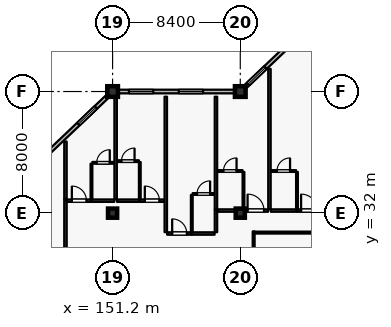
"""IFC4 building model, lengths in metres.
Left out: names, types, materials, properties, quantities, classifications, styles, units other than length and angle.
Written with IfcOpenShell. Run it as: python <this file> out.ifc"""

import sys

from ifc_helpers import new_model, si_unit, direction, frame, frame_2d, origin, origin_2d, place, context, subcontext, project, spatial, rectangle, extrude, element, fill, save


model = new_model("IFC4")
c1 = context("Model", 3, precision=1e-05, world=origin(), true_north=direction((0.0, 1.0)))
c2 = subcontext(c1, "Body", "Model", "MODEL_VIEW")
j1 = project(units=[si_unit("LENGTHUNIT", "METRE"), si_unit("PLANEANGLEUNIT", "RADIAN")], contexts=[c1])
p1 = place(None, origin())
s1 = spatial("IfcSite", under=j1, at=p1, CompositionType="ELEMENT")
p2 = place(p1, origin())
s2 = spatial("IfcBuilding", under=s1, at=p2, CompositionType="ELEMENT")
p3 = place(p2, frame((0.0, 0.0, 32.4)))
s3 = spatial("IfcBuildingStorey", under=s2, at=p3, CompositionType="ELEMENT", Elevation=32.4)
for number, where, z_axis, x_axis in (
    (1, (151.2, 40.0, 0.0), (0.0, 0.0, 1.0), (1.0, 0.0, 0.0)),
    (2, (159.6, 40.0, 0.0), (0.0, 0.0, 1.0), (1.0, 0.0, 0.0)),
):
    element("IfcColumn", number, at=place(p3, frame(where, z_axis=z_axis, x_axis=x_axis)), inside=s3, PredefinedType="COLUMN", context=c2, shape_type="SweptSolid", body=[
        extrude(rectangle(XDim=0.7, YDim=0.7, at=origin_2d()), origin(), (0.0, 0.0, 1.0), 3.6),
    ])
for number, where, z_axis, x_axis in (
    (3, (151.2, 32.0, 0.0), (0.0, 0.0, 1.0), (1.0, 0.0, 0.0)),
    (4, (159.6, 32.0, 0.0), (0.0, 0.0, 1.0), (1.0, 0.0, 0.0)),
):
    element("IfcColumn", number, at=place(p3, frame(where, z_axis=z_axis, x_axis=x_axis)), inside=s3, PredefinedType="COLUMN", context=c2, shape_type="SweptSolid", body=[
        extrude(rectangle(XDim=0.6, YDim=0.6, at=origin_2d()), origin(), (0.0, 0.0, 1.0), 3.6),
    ])
p4 = place(p3, frame((143.15, 32.333, 0.0), z_axis=(0.0, 0.0, 1.0), x_axis=(0.724116091282, 0.689678103427, 0.0)))
e5 = element("IfcWall", 5, at=p4, inside=s3, PredefinedType="SOLIDWALL", context=c2, shape_type="SweptSolid", body=[
    extrude(rectangle(XDim=10.634, YDim=0.24, at=frame_2d((5.317, 0.0))), origin(), (0.0, 0.0, 1.0), 2.94),
])
p5 = place(p4, frame((0.27, 0.0, 0.8)))
e6 = element("IfcOpeningElement", 6, at=p5, cuts=e5, PredefinedType="OPENING", context=c2, shape_type="SweptSolid", body=[
    extrude(rectangle(XDim=1.6, YDim=1.6, at=frame_2d((0.8, 0.8))), frame((0.0, 0.13, 0.0), z_axis=(0.0, -1.0, 0.0), x_axis=(1.0, 0.0, 0.0)), (0.0, 0.0, 1.0), 0.26),
])
p6 = place(p4, frame((3.757, 0.0, 0.8)))
e7 = element("IfcOpeningElement", 7, at=p6, cuts=e5, PredefinedType="OPENING", context=c2, shape_type="SweptSolid", body=[
    extrude(rectangle(XDim=1.6, YDim=1.6, at=frame_2d((0.8, 0.8))), frame((0.0, 0.13, 0.0), z_axis=(0.0, -1.0, 0.0), x_axis=(1.0, 0.0, 0.0)), (0.0, 0.0, 1.0), 0.26),
])
p7 = place(p4, frame((8.004, 0.0, 0.8)))
e8 = element("IfcOpeningElement", 8, at=p7, cuts=e5, PredefinedType="OPENING", context=c2, shape_type="SweptSolid", body=[
    extrude(rectangle(XDim=1.6, YDim=1.6, at=frame_2d((0.8, 0.8))), frame((0.0, 0.13, 0.0), z_axis=(0.0, -1.0, 0.0), x_axis=(1.0, 0.0, 0.0)), (0.0, 0.0, 1.0), 0.26),
])
p8 = place(p3, frame((151.55, 40.0, 0.0), z_axis=(0.0, 0.0, 1.0), x_axis=(1.0, 0.0, 0.0)))
e9 = element("IfcWall", 9, at=p8, inside=s3, PredefinedType="SOLIDWALL", context=c2, shape_type="SweptSolid", body=[
    extrude(rectangle(XDim=7.7, YDim=0.24, at=frame_2d((3.85, 0.0))), origin(), (0.0, 0.0, 1.0), 2.94),
])
p9 = place(p8, frame((0.725, 0.0, 0.8)))
e10 = element("IfcOpeningElement", 10, at=p9, cuts=e9, PredefinedType="OPENING", context=c2, shape_type="SweptSolid", body=[
    extrude(rectangle(XDim=1.6, YDim=1.6, at=frame_2d((0.8, 0.8))), frame((0.0, 0.13, 0.0), z_axis=(0.0, -1.0, 0.0), x_axis=(1.0, 0.0, 0.0)), (0.0, 0.0, 1.0), 0.26),
])
p10 = place(p8, frame((4.0, 0.0, 0.8)))
e11 = element("IfcOpeningElement", 11, at=p10, cuts=e9, PredefinedType="OPENING", context=c2, shape_type="SweptSolid", body=[
    extrude(rectangle(XDim=1.6, YDim=1.6, at=frame_2d((0.8, 0.8))), frame((0.0, 0.13, 0.0), z_axis=(0.0, -1.0, 0.0), x_axis=(1.0, 0.0, 0.0)), (0.0, 0.0, 1.0), 0.26),
])
p11 = place(p3, frame((159.95, 40.333, 0.0), z_axis=(0.0, 0.0, 1.0), x_axis=(0.724105170588, 0.689689569247, 0.0)))
e12 = element("IfcWall", 12, at=p11, inside=s3, PredefinedType="SOLIDWALL", context=c2, shape_type="SweptSolid", body=[
    extrude(rectangle(XDim=10.634, YDim=0.24, at=frame_2d((5.317, 0.0))), origin(), (0.0, 0.0, 1.0), 2.89),
])
p12 = place(p11, frame((0.215, 0.0, 0.8)))
e13 = element("IfcOpeningElement", 13, at=p12, cuts=e12, PredefinedType="OPENING", context=c2, shape_type="SweptSolid", body=[
    extrude(rectangle(XDim=1.6, YDim=1.6, at=frame_2d((0.8, 0.8))), frame((0.0, 0.13, 0.0), z_axis=(0.0, -1.0, 0.0), x_axis=(1.0, 0.0, 0.0)), (0.0, 0.0, 1.0), 0.26),
])
p13 = place(p11, frame((3.599, 0.0, 0.8)))
e14 = element("IfcOpeningElement", 14, at=p13, cuts=e12, PredefinedType="OPENING", context=c2, shape_type="SweptSolid", body=[
    extrude(rectangle(XDim=2.0, YDim=1.75, at=frame_2d((1.0, 0.875))), frame((0.0, 0.13, 0.0), z_axis=(0.0, -1.0, 0.0), x_axis=(1.0, 0.0, 0.0)), (0.0, 0.0, 1.0), 0.26),
])
p14 = place(p11, frame((7.901, 0.0, 0.8)))
e15 = element("IfcOpeningElement", 15, at=p14, cuts=e12, PredefinedType="OPENING", context=c2, shape_type="SweptSolid", body=[
    extrude(rectangle(XDim=2.0, YDim=1.75, at=frame_2d((1.0, 0.875))), frame((0.0, 0.13, 0.0), z_axis=(0.0, -1.0, 0.0), x_axis=(1.0, 0.0, 0.0)), (0.0, 0.0, 1.0), 0.26),
])
p15 = place(p3, frame((148.1, 28.46, 0.0), z_axis=(0.0, 0.0, 1.0), x_axis=(0.0, 1.0, 0.0)))
e16 = element("IfcWall", 16, at=p15, inside=s3, PredefinedType="PARTITIONING", context=c2, shape_type="SweptSolid", body=[
    extrude(rectangle(XDim=4.44, YDim=0.16, at=frame_2d((2.22, 0.0))), origin(), (0.0, 0.0, 1.0), 3.335),
])
p16 = place(p3, frame((148.19, 32.82, 0.0), z_axis=(0.0, 0.0, 1.0), x_axis=(1.0, 0.0, 0.0)))
e17 = element("IfcWall", 17, at=p16, inside=s3, PredefinedType="PARTITIONING", context=c2, shape_type="SweptSolid", body=[
    extrude(rectangle(XDim=1.62, YDim=0.16, at=frame_2d((0.81, 0.0))), origin(), (0.0, 0.0, 1.0), 3.335),
])
p17 = place(p16, frame((0.33, 0.0, 0.0)))
e18 = element("IfcOpeningElement", 18, at=p17, cuts=e17, PredefinedType="OPENING", context=c2, shape_type="SweptSolid", body=[
    extrude(rectangle(XDim=0.96, YDim=2.2, at=frame_2d((0.48, 1.1))), frame((0.0, 0.09, 0.0), z_axis=(0.0, -1.0, 0.0), x_axis=(1.0, 0.0, 0.0)), (0.0, 0.0, 1.0), 0.18),
])
p18 = place(p3, frame((149.82, 32.82, 0.0), z_axis=(0.0, 0.0, 1.0), x_axis=(1.0, 0.0, 0.0)))
e19 = element("IfcWall", 19, at=p18, inside=s3, PredefinedType="PARTITIONING", context=c2, shape_type="SweptSolid", body=[
    extrude(rectangle(XDim=1.49, YDim=0.16, at=frame_2d((0.745, 0.0))), origin(), (0.0, 0.0, 1.0), 3.335),
])
p19 = place(p3, frame((149.81, 32.91, 0.0), z_axis=(0.0, 0.0, 1.0), x_axis=(0.0, 1.0, 0.0)))
e20 = element("IfcWall", 20, at=p19, inside=s3, PredefinedType="PARTITIONING", context=c2, shape_type="SweptSolid", body=[
    extrude(rectangle(XDim=2.34, YDim=0.115, at=frame_2d((1.17, 0.0))), origin(), (0.0, 0.0, 1.0), 3.335),
])
p20 = place(p3, frame((149.87, 35.31, 0.0), z_axis=(0.0, 0.0, 1.0), x_axis=(1.0, 0.0, 0.0)))
e21 = element("IfcWall", 21, at=p20, inside=s3, PredefinedType="PARTITIONING", context=c2, shape_type="SweptSolid", body=[
    extrude(rectangle(XDim=1.43, YDim=0.115, at=frame_2d((0.715, 0.0))), origin(), (0.0, 0.0, 1.0), 3.335),
])
p21 = place(p20, frame((0.285, 0.0, 0.0)))
e22 = element("IfcOpeningElement", 22, at=p21, cuts=e21, PredefinedType="OPENING", context=c2, shape_type="SweptSolid", body=[
    extrude(rectangle(XDim=0.86, YDim=2.12, at=frame_2d((0.43, 1.06))), frame((0.0, 0.067, 0.0), z_axis=(0.0, -1.0, 0.0), x_axis=(1.0, 0.0, 0.0)), (0.0, 0.0, 1.0), 0.135),
])
p22 = place(p3, frame((148.1, 32.91, 0.0), z_axis=(0.0, 0.0, 1.0), x_axis=(0.0, 1.0, 0.0)))
e23 = element("IfcWall", 23, at=p22, inside=s3, PredefinedType="PARTITIONING", context=c2, shape_type="SweptSolid", body=[
    extrude(rectangle(XDim=3.8, YDim=0.16, at=frame_2d((1.9, 0.0))), origin(), (0.0, 0.0, 1.0), 3.335),
])
p23 = place(p3, frame((151.49, 32.82, 0.0), z_axis=(0.0, 0.0, 1.0), x_axis=(1.0, 0.0, 0.0)))
e24 = element("IfcWall", 24, at=p23, inside=s3, PredefinedType="PARTITIONING", context=c2, shape_type="SweptSolid", body=[
    extrude(rectangle(XDim=1.49, YDim=0.16, at=frame_2d((0.745, 0.0))), origin(), (0.0, 0.0, 1.0), 3.335),
])
p24 = place(p3, frame((152.99, 32.82, 0.0), z_axis=(0.0, 0.0, 1.0), x_axis=(1.0, 0.0, 0.0)))
e25 = element("IfcWall", 25, at=p24, inside=s3, PredefinedType="PARTITIONING", context=c2, shape_type="SweptSolid", body=[
    extrude(rectangle(XDim=1.62, YDim=0.16, at=frame_2d((0.81, 0.0))), origin(), (0.0, 0.0, 1.0), 3.335),
])
p25 = place(p24, frame((0.33, 0.0, 0.0)))
e26 = element("IfcOpeningElement", 26, at=p25, cuts=e25, PredefinedType="OPENING", context=c2, shape_type="SweptSolid", body=[
    extrude(rectangle(XDim=0.96, YDim=2.2, at=frame_2d((0.48, 1.1))), frame((0.0, 0.09, 0.0), z_axis=(0.0, -1.0, 0.0), x_axis=(1.0, 0.0, 0.0)), (0.0, 0.0, 1.0), 0.18),
])
p26 = place(p3, frame((152.99, 32.91, 0.0), z_axis=(0.0, 0.0, 1.0), x_axis=(0.0, 1.0, 0.0)))
e27 = element("IfcWall", 27, at=p26, inside=s3, PredefinedType="PARTITIONING", context=c2, shape_type="SweptSolid", body=[
    extrude(rectangle(XDim=2.45, YDim=0.115, at=frame_2d((1.225, 0.0))), origin(), (0.0, 0.0, 1.0), 3.335),
])
p27 = place(p3, frame((151.5, 35.42, 0.0), z_axis=(0.0, 0.0, 1.0), x_axis=(1.0, 0.0, 0.0)))
e28 = element("IfcWall", 28, at=p27, inside=s3, PredefinedType="PARTITIONING", context=c2, shape_type="SweptSolid", body=[
    extrude(rectangle(XDim=1.43, YDim=0.115, at=frame_2d((0.715, 0.0))), origin(), (0.0, 0.0, 1.0), 3.335),
])
p28 = place(p27, frame((0.285, 0.0, 0.0)))
e29 = element("IfcOpeningElement", 29, at=p28, cuts=e28, PredefinedType="OPENING", context=c2, shape_type="SweptSolid", body=[
    extrude(rectangle(XDim=0.86, YDim=2.12, at=frame_2d((0.43, 1.06))), frame((0.0, 0.067, 0.0), z_axis=(0.0, -1.0, 0.0), x_axis=(1.0, 0.0, 0.0)), (0.0, 0.0, 1.0), 0.135),
])
p29 = place(p3, frame((151.4, 32.91, 0.0), z_axis=(0.0, 0.0, 1.0), x_axis=(0.0, 1.0, 0.0)))
e30 = element("IfcWall", 30, at=p29, inside=s3, PredefinedType="PARTITIONING", context=c2, shape_type="SweptSolid", body=[
    extrude(rectangle(XDim=6.75, YDim=0.16, at=frame_2d((3.375, 0.0))), origin(), (0.0, 0.0, 1.0), 2.74),
])
p30 = place(p3, frame((154.79, 30.66, 0.0), z_axis=(0.0, 0.0, 1.0), x_axis=(1.0, 0.0, 0.0)))
e31 = element("IfcWall", 31, at=p30, inside=s3, PredefinedType="PARTITIONING", context=c2, shape_type="SweptSolid", body=[
    extrude(rectangle(XDim=1.62, YDim=0.16, at=frame_2d((0.81, 0.0))), origin(), (0.0, 0.0, 1.0), 3.335),
])
p31 = place(p30, frame((0.33, 0.0, 0.0)))
e32 = element("IfcOpeningElement", 32, at=p31, cuts=e31, PredefinedType="OPENING", context=c2, shape_type="SweptSolid", body=[
    extrude(rectangle(XDim=0.96, YDim=2.2, at=frame_2d((0.48, 1.1))), frame((0.0, 0.09, 0.0), z_axis=(0.0, -1.0, 0.0), x_axis=(1.0, 0.0, 0.0)), (0.0, 0.0, 1.0), 0.18),
])
p32 = place(p3, frame((156.42, 30.66, 0.0), z_axis=(0.0, 0.0, 1.0), x_axis=(1.0, 0.0, 0.0)))
e33 = element("IfcWall", 33, at=p32, inside=s3, PredefinedType="PARTITIONING", context=c2, shape_type="SweptSolid", body=[
    extrude(rectangle(XDim=1.49, YDim=0.16, at=frame_2d((0.745, 0.0))), origin(), (0.0, 0.0, 1.0), 3.335),
])
p33 = place(p3, frame((156.41, 30.75, 0.0), z_axis=(0.0, 0.0, 1.0), x_axis=(0.0, 1.0, 0.0)))
e34 = element("IfcWall", 34, at=p33, inside=s3, PredefinedType="PARTITIONING", context=c2, shape_type="SweptSolid", body=[
    extrude(rectangle(XDim=2.45, YDim=0.115, at=frame_2d((1.225, 0.0))), origin(), (0.0, 0.0, 1.0), 3.335),
])
p34 = place(p3, frame((156.47, 33.26, 0.0), z_axis=(0.0, 0.0, 1.0), x_axis=(1.0, 0.0, 0.0)))
e35 = element("IfcWall", 35, at=p34, inside=s3, PredefinedType="PARTITIONING", context=c2, shape_type="SweptSolid", body=[
    extrude(rectangle(XDim=1.43, YDim=0.115, at=frame_2d((0.715, 0.0))), origin(), (0.0, 0.0, 1.0), 3.335),
])
p35 = place(p34, frame((0.285, 0.0, 0.0)))
e36 = element("IfcOpeningElement", 36, at=p35, cuts=e35, PredefinedType="OPENING", context=c2, shape_type="SweptSolid", body=[
    extrude(rectangle(XDim=0.86, YDim=2.12, at=frame_2d((0.43, 1.06))), frame((0.0, 0.067, 0.0), z_axis=(0.0, -1.0, 0.0), x_axis=(1.0, 0.0, 0.0)), (0.0, 0.0, 1.0), 0.135),
])
p36 = place(p3, frame((154.7, 30.75, 0.0), z_axis=(0.0, 0.0, 1.0), x_axis=(0.0, 1.0, 0.0)))
e37 = element("IfcWall", 37, at=p36, inside=s3, PredefinedType="PARTITIONING", context=c2, shape_type="SweptSolid", body=[
    extrude(rectangle(XDim=8.91, YDim=0.16, at=frame_2d((4.455, 0.0))), origin(), (0.0, 0.0, 1.0), 3.335),
])
p37 = place(p3, frame((158.0, 30.75, 0.0), z_axis=(0.0, 0.0, 1.0), x_axis=(0.0, 1.0, 0.0)))
e38 = element("IfcWall", 38, at=p37, inside=s3, PredefinedType="PARTITIONING", context=c2, shape_type="SweptSolid", body=[
    extrude(rectangle(XDim=1.5, YDim=0.16, at=frame_2d((0.75, 0.0))), origin(), (0.0, 0.0, 1.0), 3.335),
])
p38 = place(p3, frame((158.09, 32.17, 0.0), z_axis=(0.0, 0.0, 1.0), x_axis=(1.0, 0.0, 0.0)))
e39 = element("IfcWall", 39, at=p38, inside=s3, PredefinedType="PARTITIONING", context=c2, shape_type="SweptSolid", body=[
    extrude(rectangle(XDim=1.71, YDim=0.16, at=frame_2d((0.855, 0.0))), origin(), (0.0, 0.0, 1.0), 2.84),
])
p39 = place(p3, frame((159.81, 32.17, 0.0), z_axis=(0.0, 0.0, 1.0), x_axis=(1.0, 0.0, 0.0)))
e40 = element("IfcWall", 40, at=p39, inside=s3, PredefinedType="PARTITIONING", context=c2, shape_type="SweptSolid", body=[
    extrude(rectangle(XDim=1.62, YDim=0.16, at=frame_2d((0.81, 0.0))), origin(), (0.0, 0.0, 1.0), 3.335),
])
p40 = place(p39, frame((0.27, 0.0, 0.0)))
e41 = element("IfcOpeningElement", 41, at=p40, cuts=e40, PredefinedType="OPENING", context=c2, shape_type="SweptSolid", body=[
    extrude(rectangle(XDim=1.08, YDim=2.3, at=frame_2d((0.54, 1.15))), frame((0.0, 0.09, 0.0), z_axis=(0.0, -1.0, 0.0), x_axis=(1.0, 0.0, 0.0)), (0.0, 0.0, 1.0), 0.18),
])
p41 = place(p3, frame((159.81, 32.26, 0.0), z_axis=(0.0, 0.0, 1.0), x_axis=(0.0, 1.0, 0.0)))
e42 = element("IfcWall", 42, at=p41, inside=s3, PredefinedType="PARTITIONING", context=c2, shape_type="SweptSolid", body=[
    extrude(rectangle(XDim=2.45, YDim=0.115, at=frame_2d((1.225, 0.0))), origin(), (0.0, 0.0, 1.0), 2.74),
])
p42 = place(p3, frame((158.1, 34.77, 0.0), z_axis=(0.0, 0.0, 1.0), x_axis=(1.0, 0.0, 0.0)))
e43 = element("IfcWall", 43, at=p42, inside=s3, PredefinedType="PARTITIONING", context=c2, shape_type="SweptSolid", body=[
    extrude(rectangle(XDim=1.65, YDim=0.115, at=frame_2d((0.825, 0.0))), origin(), (0.0, 0.0, 1.0), 3.335),
])
p43 = place(p42, frame((0.395, 0.0, 0.0)))
e44 = element("IfcOpeningElement", 44, at=p43, cuts=e43, PredefinedType="OPENING", context=c2, shape_type="SweptSolid", body=[
    extrude(rectangle(XDim=0.86, YDim=2.12, at=frame_2d((0.43, 1.06))), frame((0.0, 0.067, 0.0), z_axis=(0.0, -1.0, 0.0), x_axis=(1.0, 0.0, 0.0)), (0.0, 0.0, 1.0), 0.135),
])
p44 = place(p3, frame((158.0, 32.26, 0.0), z_axis=(0.0, 0.0, 1.0), x_axis=(0.0, 1.0, 0.0)))
e45 = element("IfcWall", 45, at=p44, inside=s3, PredefinedType="PARTITIONING", context=c2, shape_type="SweptSolid", body=[
    extrude(rectangle(XDim=7.4, YDim=0.16, at=frame_2d((3.7, 0.0))), origin(), (0.0, 0.0, 1.0), 3.335),
])
p45 = place(p3, frame((161.61, 32.17, 0.0), z_axis=(0.0, 0.0, 1.0), x_axis=(1.0, 0.0, 0.0)))
e46 = element("IfcWall", 46, at=p45, inside=s3, PredefinedType="PARTITIONING", context=c2, shape_type="SweptSolid", body=[
    extrude(rectangle(XDim=1.71, YDim=0.16, at=frame_2d((0.855, 0.0))), origin(), (0.0, 0.0, 1.0), 3.335),
])
p46 = place(p3, frame((163.33, 32.17, 0.0), z_axis=(0.0, 0.0, 1.0), x_axis=(1.0, 0.0, 0.0)))
e47 = element("IfcWall", 47, at=p46, inside=s3, PredefinedType="PARTITIONING", context=c2, shape_type="SweptSolid", body=[
    extrude(rectangle(XDim=1.62, YDim=0.16, at=frame_2d((0.81, 0.0))), origin(), (0.0, 0.0, 1.0), 3.335),
])
p47 = place(p46, frame((0.27, 0.0, 0.0)))
e48 = element("IfcOpeningElement", 48, at=p47, cuts=e47, PredefinedType="OPENING", context=c2, shape_type="SweptSolid", body=[
    extrude(rectangle(XDim=1.08, YDim=2.3, at=frame_2d((0.54, 1.15))), frame((0.0, 0.09, 0.0), z_axis=(0.0, -1.0, 0.0), x_axis=(1.0, 0.0, 0.0)), (0.0, 0.0, 1.0), 0.18),
])
p48 = place(p3, frame((163.33, 32.26, 0.0), z_axis=(0.0, 0.0, 1.0), x_axis=(0.0, 1.0, 0.0)))
e49 = element("IfcWall", 49, at=p48, inside=s3, PredefinedType="PARTITIONING", context=c2, shape_type="SweptSolid", body=[
    extrude(rectangle(XDim=2.45, YDim=0.115, at=frame_2d((1.225, 0.0))), origin(), (0.0, 0.0, 1.0), 3.335),
])
p49 = place(p3, frame((161.62, 34.77, 0.0), z_axis=(0.0, 0.0, 1.0), x_axis=(1.0, 0.0, 0.0)))
e50 = element("IfcWall", 50, at=p49, inside=s3, PredefinedType="PARTITIONING", context=c2, shape_type="SweptSolid", body=[
    extrude(rectangle(XDim=1.65, YDim=0.115, at=frame_2d((0.825, 0.0))), origin(), (0.0, 0.0, 1.0), 3.335),
])
p50 = place(p49, frame((0.395, 0.0, 0.0)))
e51 = element("IfcOpeningElement", 51, at=p50, cuts=e50, PredefinedType="OPENING", context=c2, shape_type="SweptSolid", body=[
    extrude(rectangle(XDim=0.86, YDim=2.12, at=frame_2d((0.43, 1.06))), frame((0.0, 0.067, 0.0), z_axis=(0.0, -1.0, 0.0), x_axis=(1.0, 0.0, 0.0)), (0.0, 0.0, 1.0), 0.135),
])
p51 = place(p3, frame((161.52, 32.26, 0.0), z_axis=(0.0, 0.0, 1.0), x_axis=(0.0, 1.0, 0.0)))
e52 = element("IfcWall", 52, at=p51, inside=s3, PredefinedType="PARTITIONING", context=c2, shape_type="SweptSolid", body=[
    extrude(rectangle(XDim=9.23, YDim=0.16, at=frame_2d((4.615, 0.0))), origin(), (0.0, 0.0, 1.0), 3.335),
])
p52 = place(p3, frame((160.48, 28.004, 0.0), z_axis=(0.0, 0.0, 1.0), x_axis=(0.0, 1.0, 0.0)))
e53 = element("IfcWall", 53, at=p52, inside=s3, PredefinedType="PARTITIONING", context=c2, shape_type="SweptSolid", body=[
    extrude(rectangle(XDim=2.796, YDim=0.125, at=frame_2d((1.398, 0.0))), origin(), (0.0, 0.0, 1.0), 3.335),
])
p53 = place(p3, frame((160.543, 30.72, 0.0), z_axis=(0.0, 0.0, 1.0), x_axis=(1.0, 0.0, 0.0)))
e54 = element("IfcWall", 54, at=p53, inside=s3, PredefinedType="PARTITIONING", context=c2, shape_type="SweptSolid", body=[
    extrude(rectangle(XDim=6.514, YDim=0.125, at=frame_2d((3.257, 0.0))), origin(), (0.0, 0.0, 1.0), 3.335),
])
p54 = place(p7, origin())
e55 = element("IfcWindow", 55, at=p54, inside=s3, PartitioningType="SINGLE_PANEL", PredefinedType="WINDOW", context=c2, shape_type="SweptSolid", body=[
    extrude(rectangle(XDim=1.6, YDim=1.6, at=frame_2d((0.8, 0.8))), frame((0.0, 0.03, 0.0), z_axis=(0.0, -1.0, 0.0), x_axis=(1.0, 0.0, 0.0)), (0.0, 0.0, 1.0), 0.06),
])
fill(e8, e55)
p55 = place(p9, origin())
e56 = element("IfcWindow", 56, at=p55, inside=s3, PartitioningType="SINGLE_PANEL", PredefinedType="WINDOW", context=c2, shape_type="SweptSolid", body=[
    extrude(rectangle(XDim=1.6, YDim=1.6, at=frame_2d((0.8, 0.8))), frame((0.0, 0.03, 0.0), z_axis=(0.0, -1.0, 0.0), x_axis=(1.0, 0.0, 0.0)), (0.0, 0.0, 1.0), 0.06),
])
fill(e10, e56)
p56 = place(p10, origin())
e57 = element("IfcWindow", 57, at=p56, inside=s3, PartitioningType="SINGLE_PANEL", PredefinedType="WINDOW", context=c2, shape_type="SweptSolid", body=[
    extrude(rectangle(XDim=1.6, YDim=1.6, at=frame_2d((0.8, 0.8))), frame((0.0, 0.03, 0.0), z_axis=(0.0, -1.0, 0.0), x_axis=(1.0, 0.0, 0.0)), (0.0, 0.0, 1.0), 0.06),
])
fill(e11, e57)
p57 = place(p12, origin())
e58 = element("IfcWindow", 58, at=p57, inside=s3, PartitioningType="SINGLE_PANEL", PredefinedType="WINDOW", context=c2, shape_type="SweptSolid", body=[
    extrude(rectangle(XDim=1.6, YDim=1.6, at=frame_2d((0.8, 0.8))), frame((0.0, 0.03, 0.0), z_axis=(0.0, -1.0, 0.0), x_axis=(1.0, 0.0, 0.0)), (0.0, 0.0, 1.0), 0.06),
])
fill(e13, e58)
p58 = place(p17, origin())
e59 = element("IfcDoor", 59, at=p58, inside=s3, OperationType="SINGLE_SWING_LEFT", PredefinedType="DOOR", context=c2, shape_type="SweptSolid", body=[
    extrude(rectangle(XDim=0.96, YDim=2.2, at=frame_2d((0.48, 1.1))), frame((0.0, 0.025, 0.0), z_axis=(0.0, -1.0, 0.0), x_axis=(1.0, 0.0, 0.0)), (0.0, 0.0, 1.0), 0.05),
])
fill(e18, e59)
p59 = place(p21, origin())
e60 = element("IfcDoor", 60, at=p59, inside=s3, OperationType="SINGLE_SWING_RIGHT", PredefinedType="DOOR", context=c2, shape_type="SweptSolid", body=[
    extrude(rectangle(XDim=0.86, YDim=2.12, at=frame_2d((0.43, 1.06))), frame((0.0, 0.025, 0.0), z_axis=(0.0, -1.0, 0.0), x_axis=(1.0, 0.0, 0.0)), (0.0, 0.0, 1.0), 0.05),
])
fill(e22, e60)
p60 = place(p25, origin())
e61 = element("IfcDoor", 61, at=p60, inside=s3, OperationType="SINGLE_SWING_LEFT", PredefinedType="DOOR", context=c2, shape_type="SweptSolid", body=[
    extrude(rectangle(XDim=0.96, YDim=2.2, at=frame_2d((0.48, 1.1))), frame((0.0, 0.025, 0.0), z_axis=(0.0, -1.0, 0.0), x_axis=(1.0, 0.0, 0.0)), (0.0, 0.0, 1.0), 0.05),
])
fill(e26, e61)
p61 = place(p28, origin())
e62 = element("IfcDoor", 62, at=p61, inside=s3, OperationType="SINGLE_SWING_RIGHT", PredefinedType="DOOR", context=c2, shape_type="SweptSolid", body=[
    extrude(rectangle(XDim=0.86, YDim=2.12, at=frame_2d((0.43, 1.06))), frame((0.0, 0.025, 0.0), z_axis=(0.0, -1.0, 0.0), x_axis=(1.0, 0.0, 0.0)), (0.0, 0.0, 1.0), 0.05),
])
fill(e29, e62)
p62 = place(p31, origin())
e63 = element("IfcDoor", 63, at=p62, inside=s3, OperationType="SINGLE_SWING_LEFT", PredefinedType="DOOR", context=c2, shape_type="SweptSolid", body=[
    extrude(rectangle(XDim=0.96, YDim=2.2, at=frame_2d((0.48, 1.1))), frame((0.0, 0.025, 0.0), z_axis=(0.0, -1.0, 0.0), x_axis=(1.0, 0.0, 0.0)), (0.0, 0.0, 1.0), 0.05),
])
fill(e32, e63)
p63 = place(p35, origin())
e64 = element("IfcDoor", 64, at=p63, inside=s3, OperationType="SINGLE_SWING_RIGHT", PredefinedType="DOOR", context=c2, shape_type="SweptSolid", body=[
    extrude(rectangle(XDim=0.86, YDim=2.12, at=frame_2d((0.43, 1.06))), frame((0.0, 0.025, 0.0), z_axis=(0.0, -1.0, 0.0), x_axis=(1.0, 0.0, 0.0)), (0.0, 0.0, 1.0), 0.05),
])
fill(e36, e64)
p64 = place(p40, origin())
e65 = element("IfcDoor", 65, at=p64, inside=s3, OperationType="SINGLE_SWING_LEFT", PredefinedType="DOOR", context=c2, shape_type="SweptSolid", body=[
    extrude(rectangle(XDim=1.08, YDim=2.3, at=frame_2d((0.54, 1.15))), frame((0.0, 0.025, 0.0), z_axis=(0.0, -1.0, 0.0), x_axis=(1.0, 0.0, 0.0)), (0.0, 0.0, 1.0), 0.05),
])
fill(e41, e65)
p65 = place(p43, origin())
e66 = element("IfcDoor", 66, at=p65, inside=s3, OperationType="SINGLE_SWING_RIGHT", PredefinedType="DOOR", context=c2, shape_type="SweptSolid", body=[
    extrude(rectangle(XDim=0.86, YDim=2.12, at=frame_2d((0.43, 1.06))), frame((0.0, 0.025, 0.0), z_axis=(0.0, -1.0, 0.0), x_axis=(1.0, 0.0, 0.0)), (0.0, 0.0, 1.0), 0.05),
])
fill(e44, e66)
p66 = place(p47, origin())
e67 = element("IfcDoor", 67, at=p66, inside=s3, OperationType="SINGLE_SWING_LEFT", PredefinedType="DOOR", context=c2, shape_type="SweptSolid", body=[
    extrude(rectangle(XDim=1.08, YDim=2.3, at=frame_2d((0.54, 1.15))), frame((0.0, 0.025, 0.0), z_axis=(0.0, -1.0, 0.0), x_axis=(1.0, 0.0, 0.0)), (0.0, 0.0, 1.0), 0.05),
])
fill(e48, e67)
p67 = place(p50, origin())
e68 = element("IfcDoor", 68, at=p67, inside=s3, OperationType="SINGLE_SWING_RIGHT", PredefinedType="DOOR", context=c2, shape_type="SweptSolid", body=[
    extrude(rectangle(XDim=0.86, YDim=2.12, at=frame_2d((0.43, 1.06))), frame((0.0, 0.025, 0.0), z_axis=(0.0, -1.0, 0.0), x_axis=(1.0, 0.0, 0.0)), (0.0, 0.0, 1.0), 0.05),
])
fill(e51, e68)
save(model, sys.argv[1])
